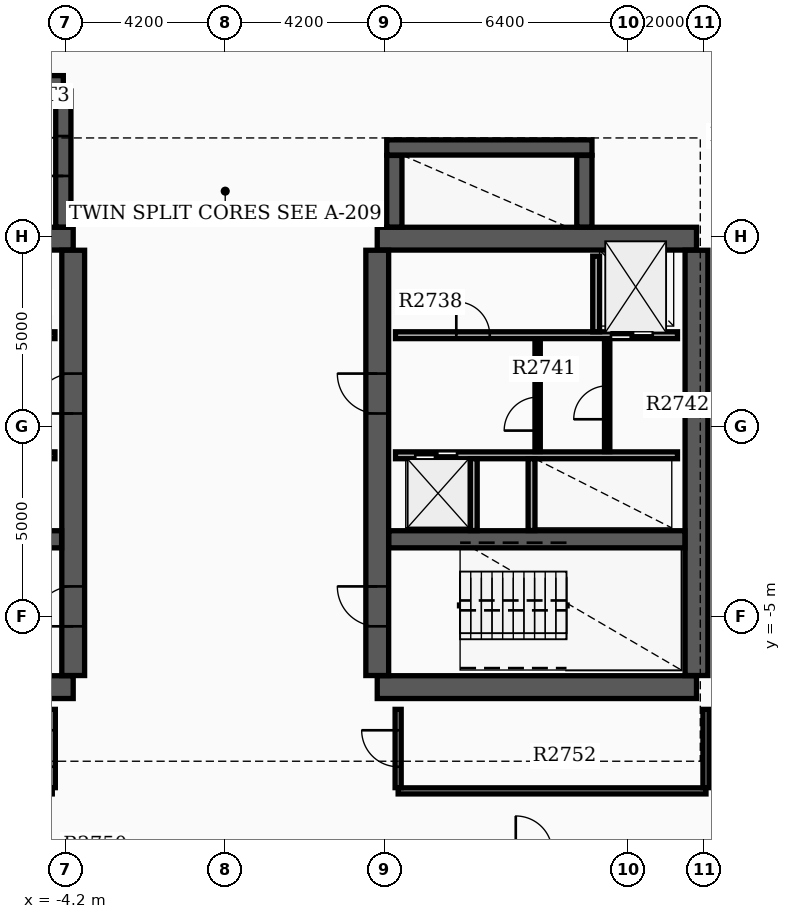
"""IFC4 building model, lengths in metres.
Left out: names, types, materials, properties, quantities, classifications, styles, units other than length and angle.
Written with IfcOpenShell. Run it as: python <this file> out.ifc"""

import sys

from ifc_helpers import new_model, si_unit, direction, frame, frame_2d, origin, place, context, subcontext, project, spatial, rectangle, extrude, element, fill, save


model = new_model("IFC4")
c1 = context("Model", 3, precision=1e-05, world=origin(), true_north=direction((0.0, 1.0)))
c2 = subcontext(c1, "Body", "Model", "MODEL_VIEW")
j1 = project(units=[si_unit("LENGTHUNIT", "METRE"), si_unit("PLANEANGLEUNIT", "RADIAN")], contexts=[c1])
p1 = place(None, origin())
s1 = spatial("IfcSite", under=j1, at=p1, CompositionType="ELEMENT")
p2 = place(p1, origin())
s2 = spatial("IfcBuilding", under=s1, at=p2, CompositionType="ELEMENT")
p3 = place(p2, frame((0.0, 0.0, 172.2)))
s3 = spatial("IfcBuildingStorey", under=s2, at=p3, CompositionType="ELEMENT", Elevation=172.2)
for number, where, z_axis, x_axis in (
    (1, (-12.4, -6.85, 0.0), (0.0, 0.0, 1.0), (1.0, 0.0, 0.0)),
    (2, (-12.4, 4.95, 0.0), (0.0, 0.0, 1.0), (1.0, 0.0, 0.0)),
):
    element("IfcWall", number, at=place(p3, frame(where, z_axis=z_axis, x_axis=x_axis)), inside=s3, PredefinedType="SHEAR", context=c2, shape_type="SweptSolid", body=[
        extrude(rectangle(XDim=8.4, YDim=0.6, at=frame_2d((4.2, 0.0))), origin(), (0.0, 0.0, 1.0), 3.7),
    ])
p4 = place(p3, frame((-4.0, -6.545, 0.0), z_axis=(0.0, 0.0, 1.0), x_axis=(0.0, 1.0, 0.0)))
e3 = element("IfcWall", 3, at=p4, inside=s3, PredefinedType="SHEAR", context=c2, shape_type="SweptSolid", body=[
    extrude(rectangle(XDim=11.19, YDim=0.6, at=frame_2d((5.595, 0.0))), origin(), (0.0, 0.0, 1.0), 3.7),
])
p5 = place(p4, frame((1.295, 0.0, 0.0)))
e4 = element("IfcOpeningElement", 4, at=p5, cuts=e3, PredefinedType="OPENING", context=c2, shape_type="SweptSolid", body=[
    extrude(rectangle(XDim=1.05, YDim=2.15, at=frame_2d((0.525, 1.075))), frame((0.0, 0.31, 0.0), z_axis=(0.0, -1.0, 0.0), x_axis=(1.0, 0.0, 0.0)), (0.0, 0.0, 1.0), 0.62),
])
p6 = place(p4, frame((6.895, 0.0, 0.0)))
e5 = element("IfcOpeningElement", 5, at=p6, cuts=e3, PredefinedType="OPENING", context=c2, shape_type="SweptSolid", body=[
    extrude(rectangle(XDim=1.05, YDim=2.15, at=frame_2d((0.525, 1.075))), frame((0.0, 0.31, 0.0), z_axis=(0.0, -1.0, 0.0), x_axis=(1.0, 0.0, 0.0)), (0.0, 0.0, 1.0), 0.62),
])
p7 = place(p3, frame((-12.095, -2.96, 0.0), z_axis=(0.0, 0.0, 1.0), x_axis=(1.0, 0.0, 0.0)))
e6 = element("IfcWall", 6, at=p7, inside=s3, PredefinedType="SHEAR", context=c2, shape_type="SweptSolid", body=[
    extrude(rectangle(XDim=7.79, YDim=0.45, at=frame_2d((3.895, 0.0))), origin(), (0.0, 0.0, 1.0), 3.7),
])
for number, where, z_axis, x_axis in (
    (7, (4.0, -6.85, 0.0), (0.0, 0.0, 1.0), (1.0, 0.0, 0.0)),
    (8, (4.0, 4.95, 0.0), (0.0, 0.0, 1.0), (1.0, 0.0, 0.0)),
):
    element("IfcWall", number, at=place(p3, frame(where, z_axis=z_axis, x_axis=x_axis)), inside=s3, PredefinedType="SHEAR", context=c2, shape_type="SweptSolid", body=[
        extrude(rectangle(XDim=8.4, YDim=0.6, at=frame_2d((4.2, 0.0))), origin(), (0.0, 0.0, 1.0), 3.7),
    ])
p8 = place(p3, frame((4.0, -6.545, 0.0), z_axis=(0.0, 0.0, 1.0), x_axis=(0.0, 1.0, 0.0)))
e9 = element("IfcWall", 9, at=p8, inside=s3, PredefinedType="SHEAR", context=c2, shape_type="SweptSolid", body=[
    extrude(rectangle(XDim=11.19, YDim=0.6, at=frame_2d((5.595, 0.0))), origin(), (0.0, 0.0, 1.0), 3.7),
])
p9 = place(p8, frame((1.295, 0.0, 0.0)))
e10 = element("IfcOpeningElement", 10, at=p9, cuts=e9, PredefinedType="OPENING", context=c2, shape_type="SweptSolid", body=[
    extrude(rectangle(XDim=1.05, YDim=2.15, at=frame_2d((0.525, 1.075))), frame((0.0, 0.31, 0.0), z_axis=(0.0, -1.0, 0.0), x_axis=(1.0, 0.0, 0.0)), (0.0, 0.0, 1.0), 0.62),
])
p10 = place(p8, frame((6.895, 0.0, 0.0)))
e11 = element("IfcOpeningElement", 11, at=p10, cuts=e9, PredefinedType="OPENING", context=c2, shape_type="SweptSolid", body=[
    extrude(rectangle(XDim=1.05, YDim=2.15, at=frame_2d((0.525, 1.075))), frame((0.0, 0.31, 0.0), z_axis=(0.0, -1.0, 0.0), x_axis=(1.0, 0.0, 0.0)), (0.0, 0.0, 1.0), 0.62),
])
p11 = place(p3, frame((12.4, -6.545, 0.0), z_axis=(0.0, 0.0, 1.0), x_axis=(0.0, 1.0, 0.0)))
e12 = element("IfcWall", 12, at=p11, inside=s3, PredefinedType="SHEAR", context=c2, shape_type="SweptSolid", body=[
    extrude(rectangle(XDim=11.19, YDim=0.6, at=frame_2d((5.595, 0.0))), origin(), (0.0, 0.0, 1.0), 3.7),
])
p12 = place(p3, frame((4.305, -2.96, 0.0), z_axis=(0.0, 0.0, 1.0), x_axis=(1.0, 0.0, 0.0)))
e13 = element("IfcWall", 13, at=p12, inside=s3, PredefinedType="SHEAR", context=c2, shape_type="SweptSolid", body=[
    extrude(rectangle(XDim=7.79, YDim=0.45, at=frame_2d((3.895, 0.0))), origin(), (0.0, 0.0, 1.0), 3.7),
])
p13 = place(p3, frame((-12.22, 9.04, 0.0), z_axis=(0.0, 0.0, 1.0), x_axis=(1.0, 0.0, 0.0)))
e14 = element("IfcWall", 14, at=p13, inside=s3, PredefinedType="SHEAR", context=c2, shape_type="SweptSolid", body=[
    extrude(rectangle(XDim=7.96, YDim=0.4, at=frame_2d((3.98, 0.0))), origin(), (0.0, 0.0, 1.0), 3.7),
])
p14 = place(p3, frame((-4.26, 5.255, 0.0), z_axis=(0.0, 0.0, 1.0), x_axis=(0.0, 1.0, 0.0)))
e15 = element("IfcWall", 15, at=p14, inside=s3, PredefinedType="SHEAR", context=c2, shape_type="SweptSolid", body=[
    extrude(rectangle(XDim=3.58, YDim=0.4, at=frame_2d((1.79, 0.0))), origin(), (0.0, 0.0, 1.0), 3.7),
])
p15 = place(p14, frame((1.345, 0.0, 0.0)))
e16 = element("IfcOpeningElement", 16, at=p15, cuts=e15, PredefinedType="OPENING", context=c2, shape_type="SweptSolid", body=[
    extrude(rectangle(XDim=1.05, YDim=2.15, at=frame_2d((0.525, 1.075))), frame((0.0, 0.21, 0.0), z_axis=(0.0, -1.0, 0.0), x_axis=(1.0, 0.0, 0.0)), (0.0, 0.0, 1.0), 0.42),
])
p16 = place(p3, frame((4.45, 5.255, 0.0), z_axis=(0.0, 0.0, 1.0), x_axis=(0.0, 1.0, 0.0)))
e17 = element("IfcWall", 17, at=p16, inside=s3, PredefinedType="SHEAR", context=c2, shape_type="SweptSolid", body=[
    extrude(rectangle(XDim=1.885, YDim=0.4, at=frame_2d((0.942, 0.0))), origin(), (0.0, 0.0, 1.0), 3.7),
])
p17 = place(p3, frame((4.25, 7.35, 0.0), z_axis=(0.0, 0.0, 1.0), x_axis=(1.0, 0.0, 0.0)))
e18 = element("IfcWall", 18, at=p17, inside=s3, PredefinedType="SHEAR", context=c2, shape_type="SweptSolid", body=[
    extrude(rectangle(XDim=5.4, YDim=0.4, at=frame_2d((2.7, 0.0))), origin(), (0.0, 0.0, 1.0), 3.7),
])
p18 = place(p3, frame((9.45, 5.255, 0.0), z_axis=(0.0, 0.0, 1.0), x_axis=(0.0, 1.0, 0.0)))
e19 = element("IfcWall", 19, at=p18, inside=s3, PredefinedType="SHEAR", context=c2, shape_type="SweptSolid", body=[
    extrude(rectangle(XDim=1.885, YDim=0.4, at=frame_2d((0.942, 0.0))), origin(), (0.0, 0.0, 1.0), 3.7),
])
p19 = place(p3, frame((-11.9, 2.41, 0.0), z_axis=(0.0, 0.0, 1.0), x_axis=(1.0, 0.0, 0.0)))
e20 = element("IfcWall", 20, at=p19, inside=s3, PredefinedType="SOLIDWALL", context=c2, shape_type="SweptSolid", body=[
    extrude(rectangle(XDim=7.42, YDim=0.18, at=frame_2d((3.71, 0.0))), origin(), (0.0, 0.0, 1.0), 2.96),
])
p20 = place(p19, frame((0.55, 0.0, 0.0)))
e21 = element("IfcOpeningElement", 21, at=p20, cuts=e20, PredefinedType="OPENING", context=c2, shape_type="SweptSolid", body=[
    extrude(rectangle(XDim=1.1, YDim=2.15, at=frame_2d((0.55, 1.075))), frame((0.0, 0.1, 0.0), z_axis=(0.0, -1.0, 0.0), x_axis=(1.0, 0.0, 0.0)), (0.0, 0.0, 1.0), 0.2),
])
p21 = place(p19, frame((4.9, 0.0, 0.0)))
e22 = element("IfcOpeningElement", 22, at=p21, cuts=e20, PredefinedType="OPENING", context=c2, shape_type="SweptSolid", body=[
    extrude(rectangle(XDim=0.88, YDim=2.1, at=frame_2d((0.44, 1.05))), frame((0.0, 0.1, 0.0), z_axis=(0.0, -1.0, 0.0), x_axis=(1.0, 0.0, 0.0)), (0.0, 0.0, 1.0), 0.2),
])
p22 = place(p3, frame((4.48, 2.41, 0.0), z_axis=(0.0, 0.0, 1.0), x_axis=(1.0, 0.0, 0.0)))
e23 = element("IfcWall", 23, at=p22, inside=s3, PredefinedType="SOLIDWALL", context=c2, shape_type="SweptSolid", body=[
    extrude(rectangle(XDim=7.42, YDim=0.18, at=frame_2d((3.71, 0.0))), origin(), (0.0, 0.0, 1.0), 2.96),
])
p23 = place(p22, frame((5.67, 0.0, 0.0)))
e24 = element("IfcOpeningElement", 24, at=p23, cuts=e23, PredefinedType="OPENING", context=c2, shape_type="SweptSolid", body=[
    extrude(rectangle(XDim=1.1, YDim=2.15, at=frame_2d((0.55, 1.075))), frame((0.0, 0.1, 0.0), z_axis=(0.0, -1.0, 0.0), x_axis=(1.0, 0.0, 0.0)), (0.0, 0.0, 1.0), 0.2),
])
p24 = place(p22, frame((1.6, 0.0, 0.0)))
e25 = element("IfcOpeningElement", 25, at=p24, cuts=e23, PredefinedType="OPENING", context=c2, shape_type="SweptSolid", body=[
    extrude(rectangle(XDim=0.88, YDim=2.1, at=frame_2d((0.44, 1.05))), frame((0.0, 0.1, 0.0), z_axis=(0.0, -1.0, 0.0), x_axis=(1.0, 0.0, 0.0)), (0.0, 0.0, 1.0), 0.2),
])
p25 = place(p3, frame((-11.9, -0.75, 0.0), z_axis=(0.0, 0.0, 1.0), x_axis=(1.0, 0.0, 0.0)))
e26 = element("IfcWall", 26, at=p25, inside=s3, PredefinedType="SOLIDWALL", context=c2, shape_type="SweptSolid", body=[
    extrude(rectangle(XDim=7.42, YDim=0.18, at=frame_2d((3.71, 0.0))), origin(), (0.0, 0.0, 1.0), 2.96),
])
p26 = place(p25, frame((0.45, 0.0, 0.0)))
e27 = element("IfcOpeningElement", 27, at=p26, cuts=e26, PredefinedType="OPENING", context=c2, shape_type="SweptSolid", body=[
    extrude(rectangle(XDim=1.1, YDim=2.15, at=frame_2d((0.55, 1.075))), frame((0.0, 0.1, 0.0), z_axis=(0.0, -1.0, 0.0), x_axis=(1.0, 0.0, 0.0)), (0.0, 0.0, 1.0), 0.2),
])
p27 = place(p25, frame((2.35, 0.0, 0.0)))
e28 = element("IfcOpeningElement", 28, at=p27, cuts=e26, PredefinedType="OPENING", context=c2, shape_type="SweptSolid", body=[
    extrude(rectangle(XDim=1.1, YDim=2.15, at=frame_2d((0.55, 1.075))), frame((0.0, 0.1, 0.0), z_axis=(0.0, -1.0, 0.0), x_axis=(1.0, 0.0, 0.0)), (0.0, 0.0, 1.0), 0.2),
])
p28 = place(p3, frame((4.48, -0.75, 0.0), z_axis=(0.0, 0.0, 1.0), x_axis=(1.0, 0.0, 0.0)))
e29 = element("IfcWall", 29, at=p28, inside=s3, PredefinedType="SOLIDWALL", context=c2, shape_type="SweptSolid", body=[
    extrude(rectangle(XDim=7.42, YDim=0.18, at=frame_2d((3.71, 0.0))), origin(), (0.0, 0.0, 1.0), 2.96),
])
p29 = place(p28, frame((0.52, 0.0, 0.0)))
e30 = element("IfcOpeningElement", 30, at=p29, cuts=e29, PredefinedType="OPENING", context=c2, shape_type="SweptSolid", body=[
    extrude(rectangle(XDim=1.1, YDim=2.15, at=frame_2d((0.55, 1.075))), frame((0.0, 0.1, 0.0), z_axis=(0.0, -1.0, 0.0), x_axis=(1.0, 0.0, 0.0)), (0.0, 0.0, 1.0), 0.2),
])
p30 = place(p3, frame((9.76, 2.5, 0.0), z_axis=(0.0, 0.0, 1.0), x_axis=(0.0, 1.0, 0.0)))
e31 = element("IfcWall", 31, at=p30, inside=s3, PredefinedType="SOLIDWALL", context=c2, shape_type="SweptSolid", body=[
    extrude(rectangle(XDim=1.99, YDim=0.18, at=frame_2d((0.995, 0.0))), origin(), (0.0, 0.0, 1.0), 2.96),
])
for number, where, z_axis, x_axis in (
    (32, (6.54, -2.73, 0.0), (0.0, 0.0, 1.0), (0.0, 1.0, 0.0)),
    (33, (8.06, -2.73, 0.0), (0.0, 0.0, 1.0), (0.0, 1.0, 0.0)),
):
    element("IfcWall", number, at=place(p3, frame(where, z_axis=z_axis, x_axis=x_axis)), inside=s3, PredefinedType="SOLIDWALL", context=c2, shape_type="SweptSolid", body=[
        extrude(rectangle(XDim=1.89, YDim=0.18, at=frame_2d((0.945, 0.0))), origin(), (0.0, 0.0, 1.0), 2.96),
    ])
p31 = place(p3, frame((8.22, -0.65, 0.0), z_axis=(0.0, 0.0, 1.0), x_axis=(0.0, 1.0, 0.0)))
e34 = element("IfcWall", 34, at=p31, inside=s3, PredefinedType="SOLIDWALL", context=c2, shape_type="SweptSolid", body=[
    extrude(rectangle(XDim=2.96, YDim=0.14, at=frame_2d((1.48, 0.0))), origin(), (0.0, 0.0, 1.0), 2.96),
])
p32 = place(p31, frame((0.55, 0.0, 0.0)))
e35 = element("IfcOpeningElement", 35, at=p32, cuts=e34, PredefinedType="OPENING", context=c2, shape_type="SweptSolid", body=[
    extrude(rectangle(XDim=0.88, YDim=2.1, at=frame_2d((0.44, 1.05))), frame((0.0, 0.08, 0.0), z_axis=(0.0, -1.0, 0.0), x_axis=(1.0, 0.0, 0.0)), (0.0, 0.0, 1.0), 0.16),
])
p33 = place(p3, frame((10.05, -0.652, 0.0), z_axis=(0.0, 0.0, 1.0), x_axis=(0.0, 1.0, 0.0)))
e36 = element("IfcWall", 36, at=p33, inside=s3, PredefinedType="PARTITIONING", context=c2, shape_type="SweptSolid", body=[
    extrude(rectangle(XDim=2.962, YDim=0.14, at=frame_2d((1.481, 0.0))), origin(), (0.0, 0.0, 1.0), 2.96),
])
p34 = place(p33, frame((0.85, 0.0, 0.0)))
e37 = element("IfcOpeningElement", 37, at=p34, cuts=e36, PredefinedType="OPENING", context=c2, shape_type="SweptSolid", body=[
    extrude(rectangle(XDim=0.88, YDim=2.1, at=frame_2d((0.44, 1.05))), frame((0.0, 0.08, 0.0), z_axis=(0.0, -1.0, 0.0), x_axis=(1.0, 0.0, 0.0)), (0.0, 0.0, 1.0), 0.16),
])
p35 = place(p3, frame((4.55, -9.58, 0.0), z_axis=(0.0, 0.0, 1.0), x_axis=(1.0, 0.0, 0.0)))
e38 = element("IfcWall", 38, at=p35, inside=s3, PredefinedType="PARTITIONING", context=c2, shape_type="SweptSolid", body=[
    extrude(rectangle(XDim=8.1, YDim=0.16, at=frame_2d((4.05, 0.0))), origin(), (0.0, 0.0, 1.0), 2.96),
])
p36 = place(p3, frame((4.55, -9.495, 0.0), z_axis=(0.0, 0.0, 1.0), x_axis=(0.0, 1.0, 0.0)))
e39 = element("IfcWall", 39, at=p36, inside=s3, PredefinedType="PARTITIONING", context=c2, shape_type="SweptSolid", body=[
    extrude(rectangle(XDim=2.06, YDim=0.16, at=frame_2d((1.03, 0.0))), origin(), (0.0, 0.0, 1.0), 2.96),
])
p37 = place(p36, frame((0.55, 0.0, 0.0)))
e40 = element("IfcOpeningElement", 40, at=p37, cuts=e39, PredefinedType="OPENING", context=c2, shape_type="SweptSolid", body=[
    extrude(rectangle(XDim=0.96, YDim=2.15, at=frame_2d((0.48, 1.075))), frame((0.0, 0.09, 0.0), z_axis=(0.0, -1.0, 0.0), x_axis=(1.0, 0.0, 0.0)), (0.0, 0.0, 1.0), 0.18),
])
p38 = place(p3, frame((12.65, -9.495, 0.0), z_axis=(0.0, 0.0, 1.0), x_axis=(0.0, 1.0, 0.0)))
e41 = element("IfcWall", 41, at=p38, inside=s3, PredefinedType="PARTITIONING", context=c2, shape_type="SweptSolid", body=[
    extrude(rectangle(XDim=2.06, YDim=0.16, at=frame_2d((1.03, 0.0))), origin(), (0.0, 0.0, 1.0), 2.96),
])
p39 = place(p3, frame((-4.55, -9.495, 0.0), z_axis=(0.0, 0.0, 1.0), x_axis=(0.0, 1.0, 0.0)))
e42 = element("IfcWall", 42, at=p39, inside=s3, PredefinedType="PARTITIONING", context=c2, shape_type="SweptSolid", body=[
    extrude(rectangle(XDim=2.06, YDim=0.16, at=frame_2d((1.03, 0.0))), origin(), (0.0, 0.0, 1.0), 2.96),
])
p40 = place(p39, frame((0.55, 0.0, 0.0)))
e43 = element("IfcOpeningElement", 43, at=p40, cuts=e42, PredefinedType="OPENING", context=c2, shape_type="SweptSolid", body=[
    extrude(rectangle(XDim=0.96, YDim=2.15, at=frame_2d((0.48, 1.075))), frame((0.0, 0.09, 0.0), z_axis=(0.0, -1.0, 0.0), x_axis=(1.0, 0.0, 0.0)), (0.0, 0.0, 1.0), 0.18),
])
p41 = place(p5, origin())
e44 = element("IfcDoor", 44, at=p41, inside=s3, OperationType="SINGLE_SWING_LEFT", PredefinedType="DOOR", context=c2, shape_type="SweptSolid", body=[
    extrude(rectangle(XDim=1.05, YDim=2.15, at=frame_2d((0.525, 1.075))), frame((0.0, 0.025, 0.0), z_axis=(0.0, -1.0, 0.0), x_axis=(1.0, 0.0, 0.0)), (0.0, 0.0, 1.0), 0.05),
])
fill(e4, e44)
p42 = place(p9, origin())
e45 = element("IfcDoor", 45, at=p42, inside=s3, OperationType="SINGLE_SWING_RIGHT", PredefinedType="DOOR", context=c2, shape_type="SweptSolid", body=[
    extrude(rectangle(XDim=1.05, YDim=2.15, at=frame_2d((0.525, 1.075))), frame((0.0, 0.025, 0.0), z_axis=(0.0, -1.0, 0.0), x_axis=(1.0, 0.0, 0.0)), (0.0, 0.0, 1.0), 0.05),
])
fill(e10, e45)
p43 = place(p6, origin())
e46 = element("IfcDoor", 46, at=p43, inside=s3, OperationType="SINGLE_SWING_LEFT", PredefinedType="DOOR", context=c2, shape_type="SweptSolid", body=[
    extrude(rectangle(XDim=1.05, YDim=2.15, at=frame_2d((0.525, 1.075))), frame((0.0, 0.025, 0.0), z_axis=(0.0, -1.0, 0.0), x_axis=(1.0, 0.0, 0.0)), (0.0, 0.0, 1.0), 0.05),
])
fill(e5, e46)
p44 = place(p10, origin())
e47 = element("IfcDoor", 47, at=p44, inside=s3, OperationType="SINGLE_SWING_RIGHT", PredefinedType="DOOR", context=c2, shape_type="SweptSolid", body=[
    extrude(rectangle(XDim=1.05, YDim=2.15, at=frame_2d((0.525, 1.075))), frame((0.0, 0.025, 0.0), z_axis=(0.0, -1.0, 0.0), x_axis=(1.0, 0.0, 0.0)), (0.0, 0.0, 1.0), 0.05),
])
fill(e11, e47)
p45 = place(p15, origin())
e48 = element("IfcDoor", 48, at=p45, inside=s3, OperationType="SINGLE_SWING_LEFT", PredefinedType="DOOR", context=c2, shape_type="SweptSolid", body=[
    extrude(rectangle(XDim=1.05, YDim=2.15, at=frame_2d((0.525, 1.075))), frame((0.0, 0.025, 0.0), z_axis=(0.0, -1.0, 0.0), x_axis=(1.0, 0.0, 0.0)), (0.0, 0.0, 1.0), 0.05),
])
fill(e16, e48)
p46 = place(p23, origin())
e49 = element("IfcDoor", 49, at=p46, inside=s3, OperationType="DOUBLE_DOOR_SLIDING", PredefinedType="DOOR", context=c2, shape_type="SweptSolid", body=[
    extrude(rectangle(XDim=1.1, YDim=2.15, at=frame_2d((0.55, 1.075))), frame((0.0, 0.025, 0.0), z_axis=(0.0, -1.0, 0.0), x_axis=(1.0, 0.0, 0.0)), (0.0, 0.0, 1.0), 0.05),
])
fill(e24, e49)
p47 = place(p29, origin())
e50 = element("IfcDoor", 50, at=p47, inside=s3, OperationType="DOUBLE_DOOR_SLIDING", PredefinedType="DOOR", context=c2, shape_type="SweptSolid", body=[
    extrude(rectangle(XDim=1.1, YDim=2.15, at=frame_2d((0.55, 1.075))), frame((0.0, 0.025, 0.0), z_axis=(0.0, -1.0, 0.0), x_axis=(1.0, 0.0, 0.0)), (0.0, 0.0, 1.0), 0.05),
])
fill(e30, e50)
p48 = place(p24, origin())
e51 = element("IfcDoor", 51, at=p48, inside=s3, OperationType="SINGLE_SWING_LEFT", PredefinedType="DOOR", context=c2, shape_type="SweptSolid", body=[
    extrude(rectangle(XDim=0.88, YDim=2.1, at=frame_2d((0.44, 1.05))), frame((0.0, 0.025, 0.0), z_axis=(0.0, -1.0, 0.0), x_axis=(1.0, 0.0, 0.0)), (0.0, 0.0, 1.0), 0.05),
])
fill(e25, e51)
p49 = place(p32, origin())
e52 = element("IfcDoor", 52, at=p49, inside=s3, OperationType="SINGLE_SWING_LEFT", PredefinedType="DOOR", context=c2, shape_type="SweptSolid", body=[
    extrude(rectangle(XDim=0.88, YDim=2.1, at=frame_2d((0.44, 1.05))), frame((0.0, 0.025, 0.0), z_axis=(0.0, -1.0, 0.0), x_axis=(1.0, 0.0, 0.0)), (0.0, 0.0, 1.0), 0.05),
])
fill(e35, e52)
p50 = place(p34, origin())
e53 = element("IfcDoor", 53, at=p50, inside=s3, OperationType="SINGLE_SWING_LEFT", PredefinedType="DOOR", context=c2, shape_type="SweptSolid", body=[
    extrude(rectangle(XDim=0.88, YDim=2.1, at=frame_2d((0.44, 1.05))), frame((0.0, 0.025, 0.0), z_axis=(0.0, -1.0, 0.0), x_axis=(1.0, 0.0, 0.0)), (0.0, 0.0, 1.0), 0.05),
])
fill(e37, e53)
p51 = place(p37, origin())
e54 = element("IfcDoor", 54, at=p51, inside=s3, OperationType="SINGLE_SWING_RIGHT", PredefinedType="DOOR", context=c2, shape_type="SweptSolid", body=[
    extrude(rectangle(XDim=0.96, YDim=2.15, at=frame_2d((0.48, 1.075))), frame((0.0, 0.025, 0.0), z_axis=(0.0, -1.0, 0.0), x_axis=(1.0, 0.0, 0.0)), (0.0, 0.0, 1.0), 0.05),
])
fill(e40, e54)
p52 = place(p40, origin())
e55 = element("IfcDoor", 55, at=p52, inside=s3, OperationType="SINGLE_SWING_LEFT", PredefinedType="DOOR", context=c2, shape_type="SweptSolid", body=[
    extrude(rectangle(XDim=0.96, YDim=2.15, at=frame_2d((0.48, 1.075))), frame((0.0, 0.025, 0.0), z_axis=(0.0, -1.0, 0.0), x_axis=(1.0, 0.0, 0.0)), (0.0, 0.0, 1.0), 0.05),
])
fill(e43, e55)
save(model, sys.argv[1])
